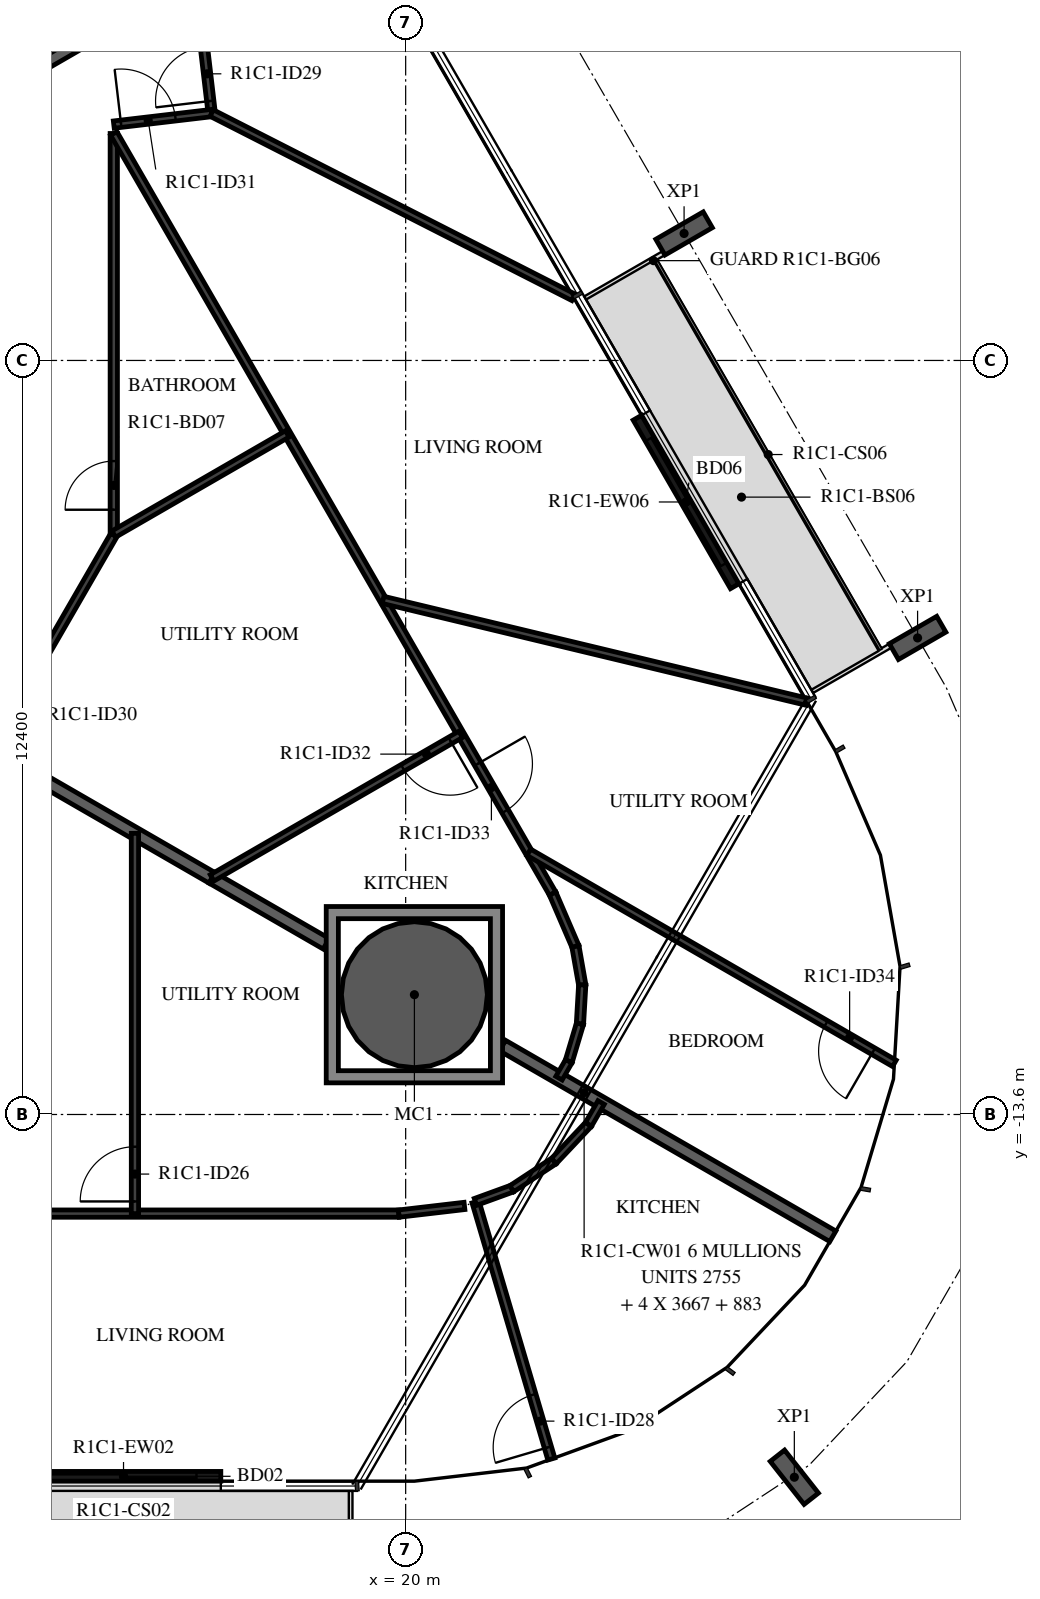
"""IFC4 building model, lengths in metres.
Left out: names, types, materials, properties, quantities, classifications, styles, units other than length and angle.
Written with IfcOpenShell. Run it as: python <this file> out.ifc"""

import sys

from ifc_helpers import new_model, si_unit, direction, frame, frame_2d, origin, origin_2d, place, context, subcontext, project, spatial, polyline, rectangle, hollow_circle, i_section, outline, extrude, element, fill, save


model = new_model("IFC4")
c1 = context("Model", 3, precision=1e-05, world=origin(), true_north=direction((0.0, 1.0)))
c2 = subcontext(c1, "Body", "Model", "MODEL_VIEW")
j1 = project(units=[si_unit("LENGTHUNIT", "METRE"), si_unit("PLANEANGLEUNIT", "RADIAN")], contexts=[c1])
p1 = place(None, origin())
s1 = spatial("IfcSite", under=j1, at=p1, CompositionType="ELEMENT")
p2 = place(p1, origin())
s2 = spatial("IfcBuilding", under=s1, at=p2, CompositionType="ELEMENT")
p3 = place(p2, frame((0.0, 0.0, 62.9)))
s3 = spatial("IfcBuildingStorey", under=s2, at=p3, CompositionType="ELEMENT", Elevation=62.9)
p4 = place(p3, frame((20.144, -11.63, -0.38), z_axis=(0.0, 0.0, 1.0), x_axis=(1.0, 0.0, 0.0)))
e1 = element("IfcColumn", 1, at=p4, inside=s3, PredefinedType="COLUMN", context=c2, shape_type="SweptSolid", body=[
    extrude(hollow_circle(Radius=1.2, WallThickness=0.06, at=origin_2d()), origin(), (0.0, 0.0, 1.0), 3.5),
])
for number, where, z_axis, x_axis in (
    (2, (26.392, -19.565, -0.38), (0.0, 0.0, 1.0), (-0.786, -0.619, 0.0)),
    (3, (28.419, -5.763, -0.38), (0.0, 0.0, 1.0), (0.5, -0.866, 0.0)),
    (4, (24.579, 0.888, -0.38), (0.0, 0.0, 1.0), (0.5, -0.866, 0.0)),
):
    element("IfcColumn", number, at=place(p3, frame(where, z_axis=z_axis, x_axis=x_axis)), inside=s3, PredefinedType="COLUMN", context=c2, shape_type="SweptSolid", body=[
        extrude(i_section(OverallWidth=0.3, OverallDepth=0.9, WebThickness=0.019, FlangeThickness=0.035, FilletRadius=0.03, at=origin_2d()), origin(), (0.0, 0.0, 1.0), 3.5),
    ])
p5 = place(p3, frame((25.411, -4.913, 0.0), z_axis=(0.0, 0.0, 1.0), x_axis=(-0.500028443584, 0.866008981251, 0.0)))
e5 = element("IfcWall", 5, at=p5, inside=s3, PredefinedType="STANDARD", context=c2, shape_type="SweptSolid", body=[
    extrude(rectangle(XDim=3.2, YDim=0.16, at=frame_2d((1.6, 0.0))), origin(), (0.0, 0.0, 1.0), 3.12),
])
p6 = place(p5, frame((0.4, 0.0, 0.0)))
e6 = element("IfcOpeningElement", 6, at=p6, cuts=e5, PredefinedType="OPENING", context=c2, shape_type="SweptSolid", body=[
    extrude(rectangle(XDim=2.4, YDim=2.4, at=frame_2d((1.2, 1.2))), frame((0.0, 0.09, 0.0), z_axis=(0.0, -1.0, 0.0), x_axis=(1.0, 0.0, 0.0)), (0.0, 0.0, 1.0), 0.18),
])
p7 = place(p3, frame((13.76, -19.55, 0.0), z_axis=(0.0, 0.0, 1.0), x_axis=(1.0, 0.0, 0.0)))
e7 = element("IfcWall", 7, at=p7, inside=s3, PredefinedType="STANDARD", context=c2, shape_type="SweptSolid", body=[
    extrude(rectangle(XDim=3.2, YDim=0.16, at=frame_2d((1.6, 0.0))), origin(), (0.0, 0.0, 1.0), 3.12),
])
p8 = place(p7, frame((0.4, 0.0, 0.0)))
e8 = element("IfcOpeningElement", 8, at=p8, cuts=e7, PredefinedType="OPENING", context=c2, shape_type="SweptSolid", body=[
    extrude(rectangle(XDim=2.4, YDim=2.4, at=frame_2d((1.2, 1.2))), frame((0.0, 0.09, 0.0), z_axis=(0.0, -1.0, 0.0), x_axis=(1.0, 0.0, 0.0)), (0.0, 0.0, 1.0), 0.18),
])
p9 = place(p3, frame((13.7, 3.476, 0.0), z_axis=(0.0, 0.0, 1.0), x_axis=(0.866014281772, 0.500019263395, 0.0)))
e9 = element("IfcWall", 9, at=p9, inside=s3, PredefinedType="STANDARD", context=c2, shape_type="SweptSolid", body=[
    extrude(rectangle(XDim=1.638, YDim=0.2, at=frame_2d((0.819, 0.0))), origin(), (0.0, 0.0, 1.0), 3.12),
])
p10 = place(p3, frame((16.817, -9.709, 0.0), z_axis=(0.0, 0.0, 1.0), x_axis=(-0.86604338933, 0.499968846828, 0.0)))
e10 = element("IfcWall", 10, at=p10, inside=s3, PredefinedType="STANDARD", context=c2, shape_type="SweptSolid", body=[
    extrude(rectangle(XDim=5.718, YDim=0.2, at=frame_2d((2.859, 0.0))), origin(), (0.0, 0.0, 1.0), 3.12),
])
p11 = place(p3, frame((27.025, -15.603, 0.0), z_axis=(0.0, 0.0, 1.0), x_axis=(-0.866030653443, 0.499990907215, 0.0)))
e11 = element("IfcWall", 11, at=p11, inside=s3, PredefinedType="STANDARD", context=c2, shape_type="SweptSolid", body=[
    extrude(rectangle(XDim=6.271, YDim=0.2, at=frame_2d((3.136, 0.0))), origin(), (0.0, 0.0, 1.0), 3.12),
])
p12 = place(p3, frame((18.694, -10.793, 0.0), z_axis=(0.0, 0.0, 1.0), x_axis=(-0.866009251978, 0.500027974705, 0.0)))
e12 = element("IfcWall", 12, at=p12, inside=s3, PredefinedType="STANDARD", context=c2, shape_type="SweptSolid", body=[
    extrude(rectangle(XDim=2.167, YDim=0.2, at=frame_2d((1.084, 0.0))), origin(), (0.0, 0.0, 1.0), 3.12),
])
p13 = place(p3, frame((7.881, -15.23, 0.0), z_axis=(0.0, 0.0, 1.0), x_axis=(1.0, 0.0, 0.0)))
e13 = element("IfcWall", 13, at=p13, inside=s3, PredefinedType="PARTITIONING", context=c2, shape_type="SweptSolid", body=[
    extrude(rectangle(XDim=12.006, YDim=0.12, at=frame_2d((6.003, 0.0))), origin(), (0.0, 0.0, 1.0), 3.12),
])
p14 = place(p13, frame((1.499, 0.0, 0.0)))
e14 = element("IfcOpeningElement", 14, at=p14, cuts=e13, PredefinedType="OPENING", context=c2, shape_type="SweptSolid", body=[
    extrude(rectangle(XDim=0.9, YDim=2.1, at=frame_2d((0.45, 1.05))), frame((0.0, 0.07, 0.0), z_axis=(0.0, -1.0, 0.0), x_axis=(1.0, 0.0, 0.0)), (0.0, 0.0, 1.0), 0.14),
])
p15 = place(p3, frame((15.548, -15.23, 0.0), z_axis=(0.0, 0.0, 1.0), x_axis=(0.0, 1.0, 0.0)))
e15 = element("IfcWall", 15, at=p15, inside=s3, PredefinedType="PARTITIONING", context=c2, shape_type="SweptSolid", body=[
    extrude(rectangle(XDim=6.253, YDim=0.12, at=frame_2d((3.127, 0.0))), origin(), (0.0, 0.0, 1.0), 3.12),
])
p16 = place(p15, frame((0.2, 0.0, 0.0)))
e16 = element("IfcOpeningElement", 16, at=p16, cuts=e15, PredefinedType="OPENING", context=c2, shape_type="SweptSolid", body=[
    extrude(rectangle(XDim=0.9, YDim=2.1, at=frame_2d((0.45, 1.05))), frame((0.0, 0.07, 0.0), z_axis=(0.0, -1.0, 0.0), x_axis=(1.0, 0.0, 0.0)), (0.0, 0.0, 1.0), 0.14),
])
p17 = place(p3, frame((20.967, -15.104, 0.0), z_axis=(0.0, 0.0, 1.0), x_axis=(-0.993231641151, -0.116150363826, 0.0)))
e17 = element("IfcWall", 17, at=p17, inside=s3, PredefinedType="PARTITIONING", context=c2, shape_type="SweptSolid", body=[
    extrude(rectangle(XDim=1.087, YDim=0.12, at=frame_2d((0.543, 0.0))), origin(), (0.0, 0.0, 1.0), 3.12),
])
p18 = place(p3, frame((22.396, -19.266, 0.0), z_axis=(0.0, 0.0, 1.0), x_axis=(-0.282873823334, 0.959157130022, 0.0)))
e18 = element("IfcWall", 18, at=p18, inside=s3, PredefinedType="PARTITIONING", context=c2, shape_type="SweptSolid", body=[
    extrude(rectangle(XDim=4.409, YDim=0.12, at=frame_2d((2.204, 0.0))), origin(), (0.0, 0.0, 1.0), 3.12),
])
p19 = place(p18, frame((0.2, 0.0, 0.0)))
e19 = element("IfcOpeningElement", 19, at=p19, cuts=e18, PredefinedType="OPENING", context=c2, shape_type="SweptSolid", body=[
    extrude(rectangle(XDim=0.9, YDim=2.1, at=frame_2d((0.45, 1.05))), frame((0.0, 0.07, 0.0), z_axis=(0.0, -1.0, 0.0), x_axis=(1.0, 0.0, 0.0)), (0.0, 0.0, 1.0), 0.14),
])
p20 = place(p3, frame((21.149, -15.038, 0.0), z_axis=(0.0, 0.0, 1.0), x_axis=(0.939726102094, 0.341928140173, 0.0)))
e20 = element("IfcWall", 20, at=p20, inside=s3, PredefinedType="PARTITIONING", context=c2, shape_type="SweptSolid", body=[
    extrude(rectangle(XDim=0.635, YDim=0.12, at=frame_2d((0.318, 0.0))), origin(), (0.0, 0.0, 1.0), 3.12),
])
p21 = place(p3, frame((21.746, -14.82, 0.0), z_axis=(0.0, 0.0, 1.0), x_axis=(0.835477570013, 0.549524549046, 0.0)))
e21 = element("IfcWall", 21, at=p21, inside=s3, PredefinedType="PARTITIONING", context=c2, shape_type="SweptSolid", body=[
    extrude(rectangle(XDim=0.829, YDim=0.12, at=frame_2d((0.415, 0.0))), origin(), (0.0, 0.0, 1.0), 3.12),
])
p22 = place(p3, frame((22.438, -14.365, 0.0), z_axis=(0.0, 0.0, 1.0), x_axis=(0.686182189596, 0.727429723535, 0.0)))
e22 = element("IfcWall", 22, at=p22, inside=s3, PredefinedType="PARTITIONING", context=c2, shape_type="SweptSolid", body=[
    extrude(rectangle(XDim=0.829, YDim=0.12, at=frame_2d((0.414, 0.0))), origin(), (0.0, 0.0, 1.0), 3.12),
])
p23 = place(p3, frame((23.007, -13.762, 0.0), z_axis=(0.0, 0.0, 1.0), x_axis=(0.499875358948, 0.866097353371, 0.0)))
e23 = element("IfcWall", 23, at=p23, inside=s3, PredefinedType="PARTITIONING", context=c2, shape_type="SweptSolid", body=[
    extrude(rectangle(XDim=0.415, YDim=0.12, at=frame_2d((0.207, 0.0))), origin(), (0.0, 0.0, 1.0), 3.12),
])
p24 = place(p3, frame((16.81, 2.868, 0.0), z_axis=(0.0, 0.0, 1.0), x_axis=(-0.117049566217, 0.993126074096, 0.0)))
e24 = element("IfcWall", 24, at=p24, inside=s3, PredefinedType="PARTITIONING", context=c2, shape_type="SweptSolid", body=[
    extrude(rectangle(XDim=1.7, YDim=0.12, at=frame_2d((0.85, 0.0))), origin(), (0.0, 0.0, 1.0), 3.12),
])
p25 = place(p24, frame((0.2, 0.0, 0.0)))
e25 = element("IfcOpeningElement", 25, at=p25, cuts=e24, PredefinedType="OPENING", context=c2, shape_type="SweptSolid", body=[
    extrude(rectangle(XDim=0.9, YDim=2.1, at=frame_2d((0.45, 1.05))), frame((0.0, 0.07, 0.0), z_axis=(0.0, -1.0, 0.0), x_axis=(1.0, 0.0, 0.0)), (0.0, 0.0, 1.0), 0.14),
])
p26 = place(p3, frame((13.164, -7.6, 0.0), z_axis=(0.0, 0.0, 1.0), x_axis=(0.499974973053, 0.866039852617, 0.0)))
e26 = element("IfcWall", 26, at=p26, inside=s3, PredefinedType="PARTITIONING", context=c2, shape_type="SweptSolid", body=[
    extrude(rectangle(XDim=4.073, YDim=0.12, at=frame_2d((2.037, 0.0))), origin(), (0.0, 0.0, 1.0), 3.12),
])
p27 = place(p26, frame((0.2, 0.0, 0.0)))
e27 = element("IfcOpeningElement", 27, at=p27, cuts=e26, PredefinedType="OPENING", context=c2, shape_type="SweptSolid", body=[
    extrude(rectangle(XDim=0.9, YDim=2.1, at=frame_2d((0.45, 1.05))), frame((0.0, 0.07, 0.0), z_axis=(0.0, -1.0, 0.0), x_axis=(1.0, 0.0, 0.0)), (0.0, 0.0, 1.0), 0.14),
])
p28 = place(p3, frame((15.2, 2.679, 0.0), z_axis=(0.0, 0.0, 1.0), x_axis=(0.993150604323, 0.116841247567, 0.0)))
e28 = element("IfcWall", 28, at=p28, inside=s3, PredefinedType="PARTITIONING", context=c2, shape_type="SweptSolid", body=[
    extrude(rectangle(XDim=1.621, YDim=0.12, at=frame_2d((0.811, 0.0))), origin(), (0.0, 0.0, 1.0), 3.12),
])
p29 = place(p28, frame((0.12, 0.0, 0.0)))
e29 = element("IfcOpeningElement", 29, at=p29, cuts=e28, PredefinedType="OPENING", context=c2, shape_type="SweptSolid", body=[
    extrude(rectangle(XDim=0.9, YDim=2.1, at=frame_2d((0.45, 1.05))), frame((0.0, 0.07, 0.0), z_axis=(0.0, -1.0, 0.0), x_axis=(1.0, 0.0, 0.0)), (0.0, 0.0, 1.0), 0.14),
])
p30 = place(p3, frame((15.2, -4.055, 0.0), z_axis=(0.0, 0.0, 1.0), x_axis=(0.0, 1.0, 0.0)))
e30 = element("IfcWall", 30, at=p30, inside=s3, PredefinedType="PARTITIONING", context=c2, shape_type="SweptSolid", body=[
    extrude(rectangle(XDim=6.588, YDim=0.12, at=frame_2d((3.294, 0.0))), origin(), (0.0, 0.0, 1.0), 3.12),
])
p31 = place(p30, frame((0.4, 0.0, 0.0)))
e31 = element("IfcOpeningElement", 31, at=p31, cuts=e30, PredefinedType="OPENING", context=c2, shape_type="SweptSolid", body=[
    extrude(rectangle(XDim=0.8, YDim=2.1, at=frame_2d((0.4, 1.05))), frame((0.0, 0.07, 0.0), z_axis=(0.0, -1.0, 0.0), x_axis=(1.0, 0.0, 0.0)), (0.0, 0.0, 1.0), 0.14),
])
p32 = place(p3, frame((16.81, 2.868, 0.0), z_axis=(0.0, 0.0, 1.0), x_axis=(0.891097252128, -0.453812392128, 0.0)))
e32 = element("IfcWall", 32, at=p32, inside=s3, PredefinedType="PARTITIONING", context=c2, shape_type="SweptSolid", body=[
    extrude(rectangle(XDim=6.677, YDim=0.12, at=frame_2d((3.338, 0.0))), origin(), (0.0, 0.0, 1.0), 3.12),
])
p33 = place(p3, frame((15.2, 2.533, 0.0), z_axis=(0.0, 0.0, 1.0), x_axis=(0.500001127339, -0.866024752914, 0.0)))
e33 = element("IfcWall", 33, at=p33, inside=s3, PredefinedType="PARTITIONING", context=c2, shape_type="SweptSolid", body=[
    extrude(rectangle(XDim=14.434, YDim=0.12, at=frame_2d((7.217, 0.0))), origin(), (0.0, 0.0, 1.0), 3.12),
])
p34 = place(p33, frame((11.97, 0.0, 0.0)))
e34 = element("IfcOpeningElement", 34, at=p34, cuts=e33, PredefinedType="OPENING", context=c2, shape_type="SweptSolid", body=[
    extrude(rectangle(XDim=0.9, YDim=2.1, at=frame_2d((0.45, 1.05))), frame((0.0, 0.07, 0.0), z_axis=(0.0, -1.0, 0.0), x_axis=(1.0, 0.0, 0.0)), (0.0, 0.0, 1.0), 0.14),
])
p35 = place(p3, frame((22.417, -9.968, 0.0), z_axis=(0.0, 0.0, 1.0), x_axis=(0.395971779074, -0.918262680379, 0.0)))
e35 = element("IfcWall", 35, at=p35, inside=s3, PredefinedType="PARTITIONING", context=c2, shape_type="SweptSolid", body=[
    extrude(rectangle(XDim=0.947, YDim=0.12, at=frame_2d((0.474, 0.0))), origin(), (0.0, 0.0, 1.0), 3.12),
])
p36 = place(p3, frame((22.792, -10.837, 0.0), z_axis=(0.0, 0.0, 1.0), x_axis=(0.17382873157, -0.984775899421, 0.0)))
e36 = element("IfcWall", 36, at=p36, inside=s3, PredefinedType="PARTITIONING", context=c2, shape_type="SweptSolid", body=[
    extrude(rectangle(XDim=0.642, YDim=0.12, at=frame_2d((0.321, 0.0))), origin(), (0.0, 0.0, 1.0), 3.12),
])
p37 = place(p3, frame((22.904, -11.469, 0.0), z_axis=(0.0, 0.0, 1.0), x_axis=(-0.05820906079, -0.998304415117, 0.0)))
e37 = element("IfcWall", 37, at=p37, inside=s3, PredefinedType="PARTITIONING", context=c2, shape_type="SweptSolid", body=[
    extrude(rectangle(XDim=0.642, YDim=0.12, at=frame_2d((0.321, 0.0))), origin(), (0.0, 0.0, 1.0), 3.12),
])
p38 = place(p3, frame((22.866, -12.11, 0.0), z_axis=(0.0, 0.0, 1.0), x_axis=(-0.286754684479, -0.958004045362, 0.0)))
e38 = element("IfcWall", 38, at=p38, inside=s3, PredefinedType="PARTITIONING", context=c2, shape_type="SweptSolid", body=[
    extrude(rectangle(XDim=0.642, YDim=0.12, at=frame_2d((0.321, 0.0))), origin(), (0.0, 0.0, 1.0), 3.12),
])
p39 = place(p3, frame((22.682, -12.725, 0.0), z_axis=(0.0, 0.0, 1.0), x_axis=(-0.500226934229, -0.865894343596, 0.0)))
e39 = element("IfcWall", 39, at=p39, inside=s3, PredefinedType="PARTITIONING", context=c2, shape_type="SweptSolid", body=[
    extrude(rectangle(XDim=0.321, YDim=0.12, at=frame_2d((0.161, 0.0))), origin(), (0.0, 0.0, 1.0), 3.12),
])
p40 = place(p3, frame((28.037, -12.759, 0.0), z_axis=(0.0, 0.0, 1.0), x_axis=(-0.866009909538, 0.500026835863, 0.0)))
e40 = element("IfcWall", 40, at=p40, inside=s3, PredefinedType="PARTITIONING", context=c2, shape_type="SweptSolid", body=[
    extrude(rectangle(XDim=6.943, YDim=0.12, at=frame_2d((3.471, 0.0))), origin(), (0.0, 0.0, 1.0), 3.12),
])
p41 = place(p40, frame((0.4, 0.0, 0.0)))
e41 = element("IfcOpeningElement", 41, at=p41, cuts=e40, PredefinedType="OPENING", context=c2, shape_type="SweptSolid", body=[
    extrude(rectangle(XDim=0.9, YDim=2.1, at=frame_2d((0.45, 1.05))), frame((0.0, 0.07, 0.0), z_axis=(0.0, -1.0, 0.0), x_axis=(1.0, 0.0, 0.0)), (0.0, 0.0, 1.0), 0.14),
])
p42 = place(p3, frame((20.905, -7.349, 0.0), z_axis=(0.0, 0.0, 1.0), x_axis=(-0.866032292145, -0.49998806882, 0.0)))
e42 = element("IfcWall", 42, at=p42, inside=s3, PredefinedType="PARTITIONING", context=c2, shape_type="SweptSolid", body=[
    extrude(rectangle(XDim=4.721, YDim=0.12, at=frame_2d((2.36, 0.0))), origin(), (0.0, 0.0, 1.0), 3.12),
])
p43 = place(p42, frame((0.2, 0.0, 0.0)))
e43 = element("IfcOpeningElement", 43, at=p43, cuts=e42, PredefinedType="OPENING", context=c2, shape_type="SweptSolid", body=[
    extrude(rectangle(XDim=0.9, YDim=2.1, at=frame_2d((0.45, 1.05))), frame((0.0, 0.07, 0.0), z_axis=(0.0, -1.0, 0.0), x_axis=(1.0, 0.0, 0.0)), (0.0, 0.0, 1.0), 0.14),
])
p44 = place(p3, frame((18.052, -2.408, 0.0), z_axis=(0.0, 0.0, 1.0), x_axis=(-0.866017718408, -0.500013311227, 0.0)))
e44 = element("IfcWall", 44, at=p44, inside=s3, PredefinedType="PARTITIONING", context=c2, shape_type="SweptSolid", body=[
    extrude(rectangle(XDim=3.294, YDim=0.12, at=frame_2d((1.647, 0.0))), origin(), (0.0, 0.0, 1.0), 3.12),
])
p45 = place(p3, frame((26.6, -6.813, 0.0), z_axis=(0.0, 0.0, 1.0), x_axis=(-0.972307508101, 0.23370517686, 0.0)))
e45 = element("IfcWall", 45, at=p45, inside=s3, PredefinedType="PARTITIONING", context=c2, shape_type="SweptSolid", body=[
    extrude(rectangle(XDim=7.17, YDim=0.12, at=frame_2d((3.585, 0.0))), origin(), (0.0, 0.0, 1.0), 3.12),
])
p46 = place(p3, origin())
e46 = element("IfcWall", 46, at=p46, inside=s3, PredefinedType="STANDARD", context=c2, shape_type="SweptSolid", body=[
    extrude(outline(polyline([(21.594, -10.18), (21.594, -13.08), (18.694, -13.08), (18.694, -10.18), (21.594, -10.18)]), holes=[polyline([(18.894, -12.88), (21.394, -12.88), (21.394, -10.38), (18.894, -10.38), (18.894, -12.88)])]), origin(), (0.0, 0.0, 1.0), 3.12),
])
p47 = place(p6, origin())
e47 = element("IfcDoor", 47, at=p47, inside=s3, OperationType="DOUBLE_DOOR_SLIDING", PredefinedType="DOOR", context=c2, shape_type="SweptSolid", body=[
    extrude(rectangle(XDim=2.4, YDim=2.4, at=frame_2d((1.2, 1.2))), frame((0.0, 0.025, 0.0), z_axis=(0.0, -1.0, 0.0), x_axis=(1.0, 0.0, 0.0)), (0.0, 0.0, 1.0), 0.05),
])
fill(e6, e47)
p48 = place(p8, origin())
e48 = element("IfcDoor", 48, at=p48, inside=s3, OperationType="DOUBLE_DOOR_SLIDING", PredefinedType="DOOR", context=c2, shape_type="SweptSolid", body=[
    extrude(rectangle(XDim=2.4, YDim=2.4, at=frame_2d((1.2, 1.2))), frame((0.0, 0.025, 0.0), z_axis=(0.0, -1.0, 0.0), x_axis=(1.0, 0.0, 0.0)), (0.0, 0.0, 1.0), 0.05),
])
fill(e8, e48)
p49 = place(p16, origin())
e49 = element("IfcDoor", 49, at=p49, inside=s3, OperationType="SINGLE_SWING_RIGHT", PredefinedType="DOOR", context=c2, shape_type="SweptSolid", body=[
    extrude(rectangle(XDim=0.9, YDim=2.1, at=frame_2d((0.45, 1.05))), frame((0.0, 0.025, 0.0), z_axis=(0.0, -1.0, 0.0), x_axis=(1.0, 0.0, 0.0)), (0.0, 0.0, 1.0), 0.05),
])
fill(e16, e49)
p50 = place(p19, origin())
e50 = element("IfcDoor", 50, at=p50, inside=s3, OperationType="SINGLE_SWING_RIGHT", PredefinedType="DOOR", context=c2, shape_type="SweptSolid", body=[
    extrude(rectangle(XDim=0.9, YDim=2.1, at=frame_2d((0.45, 1.05))), frame((0.0, 0.025, 0.0), z_axis=(0.0, -1.0, 0.0), x_axis=(1.0, 0.0, 0.0)), (0.0, 0.0, 1.0), 0.05),
])
fill(e19, e50)
p51 = place(p25, origin())
e51 = element("IfcDoor", 51, at=p51, inside=s3, OperationType="SINGLE_SWING_LEFT", PredefinedType="DOOR", context=c2, shape_type="SweptSolid", body=[
    extrude(rectangle(XDim=0.9, YDim=2.1, at=frame_2d((0.45, 1.05))), frame((0.0, 0.025, 0.0), z_axis=(0.0, -1.0, 0.0), x_axis=(1.0, 0.0, 0.0)), (0.0, 0.0, 1.0), 0.05),
])
fill(e25, e51)
p52 = place(p29, origin())
e52 = element("IfcDoor", 52, at=p52, inside=s3, OperationType="SINGLE_SWING_RIGHT", PredefinedType="DOOR", context=c2, shape_type="SweptSolid", body=[
    extrude(rectangle(XDim=0.9, YDim=2.1, at=frame_2d((0.45, 1.05))), frame((0.0, 0.025, 0.0), z_axis=(0.0, -1.0, 0.0), x_axis=(1.0, 0.0, 0.0)), (0.0, 0.0, 1.0), 0.05),
])
fill(e29, e52)
p53 = place(p31, origin())
e53 = element("IfcDoor", 53, at=p53, inside=s3, OperationType="SINGLE_SWING_LEFT", PredefinedType="DOOR", context=c2, shape_type="SweptSolid", body=[
    extrude(rectangle(XDim=0.8, YDim=2.1, at=frame_2d((0.4, 1.05))), frame((0.0, 0.025, 0.0), z_axis=(0.0, -1.0, 0.0), x_axis=(1.0, 0.0, 0.0)), (0.0, 0.0, 1.0), 0.05),
])
fill(e31, e53)
p54 = place(p43, origin())
e54 = element("IfcDoor", 54, at=p54, inside=s3, OperationType="SINGLE_SWING_LEFT", PredefinedType="DOOR", context=c2, shape_type="SweptSolid", body=[
    extrude(rectangle(XDim=0.9, YDim=2.1, at=frame_2d((0.45, 1.05))), frame((0.0, 0.025, 0.0), z_axis=(0.0, -1.0, 0.0), x_axis=(1.0, 0.0, 0.0)), (0.0, 0.0, 1.0), 0.05),
])
fill(e43, e54)
p55 = place(p34, origin())
e55 = element("IfcDoor", 55, at=p55, inside=s3, OperationType="SINGLE_SWING_LEFT", PredefinedType="DOOR", context=c2, shape_type="SweptSolid", body=[
    extrude(rectangle(XDim=0.9, YDim=2.1, at=frame_2d((0.45, 1.05))), frame((0.0, 0.025, 0.0), z_axis=(0.0, -1.0, 0.0), x_axis=(1.0, 0.0, 0.0)), (0.0, 0.0, 1.0), 0.05),
])
fill(e34, e55)
p56 = place(p41, origin())
e56 = element("IfcDoor", 56, at=p56, inside=s3, OperationType="SINGLE_SWING_LEFT", PredefinedType="DOOR", context=c2, shape_type="SweptSolid", body=[
    extrude(rectangle(XDim=0.9, YDim=2.1, at=frame_2d((0.45, 1.05))), frame((0.0, 0.025, 0.0), z_axis=(0.0, -1.0, 0.0), x_axis=(1.0, 0.0, 0.0)), (0.0, 0.0, 1.0), 0.05),
])
fill(e41, e56)
save(model, sys.argv[1])
